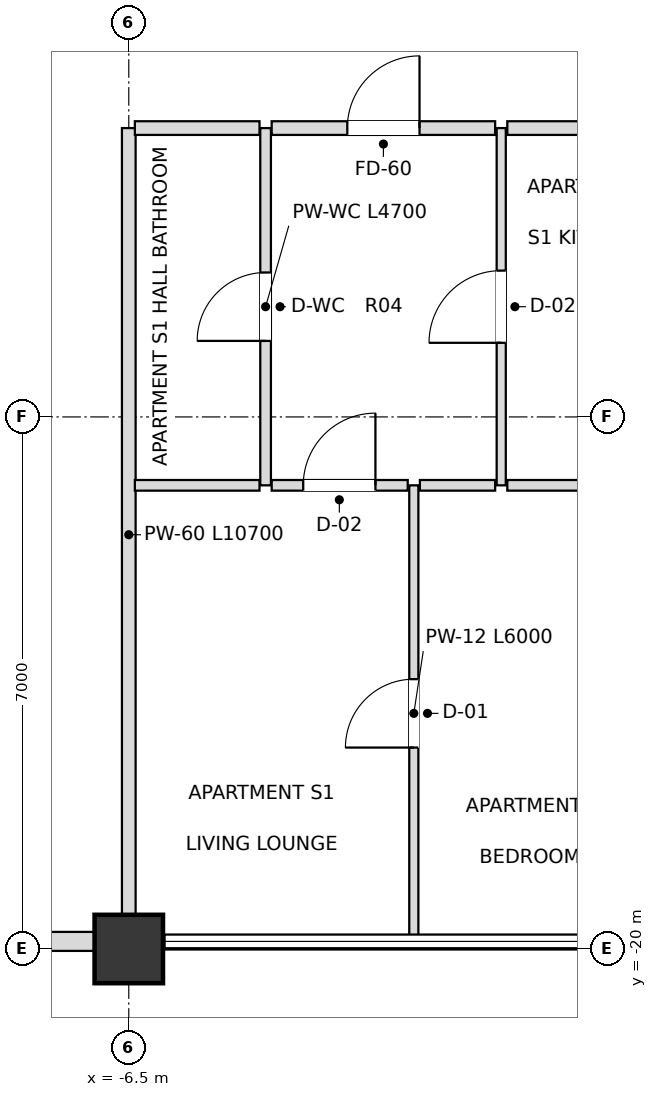
"""IFC4 building model, lengths in metres.
Left out: names, types, materials, properties, quantities, classifications, styles, units other than length and angle.
Written with IfcOpenShell. Run it as: python <this file> out.ifc"""

import sys

from ifc_helpers import new_model, si_unit, direction, frame, frame_2d, origin, origin_2d, place, context, subcontext, project, spatial, rectangle, extrude, element, fill, save


model = new_model("IFC4")
c1 = context("Model", 3, precision=1e-05, world=origin(), true_north=direction((0.0, 1.0)))
c2 = subcontext(c1, "Body", "Model", "MODEL_VIEW")
j1 = project(units=[si_unit("LENGTHUNIT", "METRE"), si_unit("PLANEANGLEUNIT", "RADIAN")], contexts=[c1])
p1 = place(None, origin())
s1 = spatial("IfcSite", under=j1, at=p1, CompositionType="ELEMENT")
p2 = place(p1, origin())
s2 = spatial("IfcBuilding", under=s1, at=p2, CompositionType="ELEMENT")
p3 = place(p2, frame((0.0, 0.0, 243.9)))
s3 = spatial("IfcBuildingStorey", under=s2, at=p3, CompositionType="ELEMENT", Elevation=243.9)
p4 = place(p3, frame((-6.5, -20.0, 0.0), z_axis=(0.0, 0.0, 1.0), x_axis=(1.0, 0.0, 0.0)))
e1 = element("IfcColumn", 1, at=p4, inside=s3, PredefinedType="USERDEFINED", context=c2, shape_type="SweptSolid", body=[
    extrude(rectangle(XDim=0.9, YDim=0.9, at=origin_2d()), origin(), (0.0, 0.0, 1.0), 3.6),
])
p5 = place(p3, frame((-11.055, -19.9, 0.0), z_axis=(0.0, 0.0, 1.0), x_axis=(1.0, 0.0, 0.0)))
e2 = element("IfcWall", 2, at=p5, inside=s3, PredefinedType="SOLIDWALL", context=c2, shape_type="SweptSolid", body=[
    extrude(rectangle(XDim=4.11, YDim=0.25, at=frame_2d((2.055, 0.0))), origin(), (0.0, 0.0, 1.0), 2.748),
])
p6 = place(p5, frame((1.155, 0.0, 0.72)))
e3 = element("IfcOpeningElement", 3, at=p6, cuts=e2, PredefinedType="OPENING", context=c2, shape_type="SweptSolid", body=[
    extrude(rectangle(XDim=1.8, YDim=1.68, at=frame_2d((0.9, 0.84))), frame((0.0, 0.135, 0.0), z_axis=(0.0, -1.0, 0.0), x_axis=(1.0, 0.0, 0.0)), (0.0, 0.0, 1.0), 0.27),
])
p7 = place(p3, frame((-6.5, -19.9, 0.0), z_axis=(0.0, 0.0, 1.0), x_axis=(0.0, 1.0, 0.0)))
e4 = element("IfcWall", 4, at=p7, inside=s3, PredefinedType="PARTITIONING", context=c2, shape_type="SweptSolid", body=[
    extrude(rectangle(XDim=10.7, YDim=0.18, at=frame_2d((5.35, 0.0))), origin(), (0.0, 0.0, 1.0), 2.826),
])
p8 = place(p3, frame((-4.7, -13.9, 0.0), z_axis=(0.0, 0.0, 1.0), x_axis=(0.0, 1.0, 0.0)))
e5 = element("IfcWall", 5, at=p8, inside=s3, PredefinedType="PARTITIONING", context=c2, shape_type="SweptSolid", body=[
    extrude(rectangle(XDim=4.7, YDim=0.14, at=frame_2d((2.35, 0.0))), origin(), (0.0, 0.0, 1.0), 3.38),
])
p9 = place(p8, frame((1.9, 0.0, 0.0)))
e6 = element("IfcOpeningElement", 6, at=p9, cuts=e5, PredefinedType="OPENING", context=c2, shape_type="SweptSolid", body=[
    extrude(rectangle(XDim=0.9, YDim=2.1, at=frame_2d((0.45, 1.05))), frame((0.0, 0.08, 0.0), z_axis=(0.0, -1.0, 0.0), x_axis=(1.0, 0.0, 0.0)), (0.0, 0.0, 1.0), 0.16),
])
p10 = place(p3, frame((-2.75, -19.9, 0.0), z_axis=(0.0, 0.0, 1.0), x_axis=(0.0, 1.0, 0.0)))
e7 = element("IfcWall", 7, at=p10, inside=s3, PredefinedType="PARTITIONING", context=c2, shape_type="SweptSolid", body=[
    extrude(rectangle(XDim=6.0, YDim=0.12, at=frame_2d((3.0, 0.0))), origin(), (0.0, 0.0, 1.0), 3.018),
])
p11 = place(p10, frame((2.55, 0.0, 0.0)))
e8 = element("IfcOpeningElement", 8, at=p11, cuts=e7, PredefinedType="OPENING", context=c2, shape_type="SweptSolid", body=[
    extrude(rectangle(XDim=0.9, YDim=2.1, at=frame_2d((0.45, 1.05))), frame((0.0, 0.07, 0.0), z_axis=(0.0, -1.0, 0.0), x_axis=(1.0, 0.0, 0.0)), (0.0, 0.0, 1.0), 0.14),
])
p12 = place(p3, frame((-1.6, -13.9, 0.0), z_axis=(0.0, 0.0, 1.0), x_axis=(0.0, 1.0, 0.0)))
e9 = element("IfcWall", 9, at=p12, inside=s3, PredefinedType="PARTITIONING", context=c2, shape_type="SweptSolid", body=[
    extrude(rectangle(XDim=4.7, YDim=0.12, at=frame_2d((2.35, 0.0))), origin(), (0.0, 0.0, 1.0), 3.38),
])
p13 = place(p12, frame((1.875, 0.0, 0.0)))
e10 = element("IfcOpeningElement", 10, at=p13, cuts=e9, PredefinedType="OPENING", context=c2, shape_type="SweptSolid", body=[
    extrude(rectangle(XDim=0.95, YDim=2.1, at=frame_2d((0.475, 1.05))), frame((0.0, 0.07, 0.0), z_axis=(0.0, -1.0, 0.0), x_axis=(1.0, 0.0, 0.0)), (0.0, 0.0, 1.0), 0.14),
])
p14 = place(p3, frame((-6.42, -13.9, 0.0), z_axis=(0.0, 0.0, 1.0), x_axis=(1.0, 0.0, 0.0)))
e11 = element("IfcWall", 11, at=p14, inside=s3, PredefinedType="PARTITIONING", context=c2, shape_type="SweptSolid", body=[
    extrude(rectangle(XDim=1.64, YDim=0.14, at=frame_2d((0.82, 0.0))), origin(), (0.0, 0.0, 1.0), 3.38),
])
p15 = place(p3, frame((-4.62, -13.9, 0.0), z_axis=(0.0, 0.0, 1.0), x_axis=(1.0, 0.0, 0.0)))
e12 = element("IfcWall", 12, at=p15, inside=s3, PredefinedType="PARTITIONING", context=c2, shape_type="SweptSolid", body=[
    extrude(rectangle(XDim=1.79, YDim=0.14, at=frame_2d((0.895, 0.0))), origin(), (0.0, 0.0, 1.0), 3.38),
])
p16 = place(p15, frame((0.415, 0.0, 0.0)))
e13 = element("IfcOpeningElement", 13, at=p16, cuts=e12, PredefinedType="OPENING", context=c2, shape_type="SweptSolid", body=[
    extrude(rectangle(XDim=0.95, YDim=2.1, at=frame_2d((0.475, 1.05))), frame((0.0, 0.08, 0.0), z_axis=(0.0, -1.0, 0.0), x_axis=(1.0, 0.0, 0.0)), (0.0, 0.0, 1.0), 0.16),
])
p17 = place(p3, frame((-2.67, -13.9, 0.0), z_axis=(0.0, 0.0, 1.0), x_axis=(1.0, 0.0, 0.0)))
e14 = element("IfcWall", 14, at=p17, inside=s3, PredefinedType="PARTITIONING", context=c2, shape_type="SweptSolid", body=[
    extrude(rectangle(XDim=0.99, YDim=0.14, at=frame_2d((0.495, 0.0))), origin(), (0.0, 0.0, 1.0), 3.38),
])
p18 = place(p3, frame((-1.52, -13.9, 0.0), z_axis=(0.0, 0.0, 1.0), x_axis=(1.0, 0.0, 0.0)))
e15 = element("IfcWall", 15, at=p18, inside=s3, PredefinedType="PARTITIONING", context=c2, shape_type="SweptSolid", body=[
    extrude(rectangle(XDim=1.89, YDim=0.14, at=frame_2d((0.945, 0.0))), origin(), (0.0, 0.0, 1.0), 3.38),
])
p19 = place(p3, frame((-6.42, -9.2, 0.0), z_axis=(0.0, 0.0, 1.0), x_axis=(1.0, 0.0, 0.0)))
e16 = element("IfcWall", 16, at=p19, inside=s3, PredefinedType="PARTITIONING", context=c2, shape_type="SweptSolid", body=[
    extrude(rectangle(XDim=1.64, YDim=0.18, at=frame_2d((0.82, 0.0))), origin(), (0.0, 0.0, 1.0), 3.38),
])
p20 = place(p3, frame((-4.62, -9.2, 0.0), z_axis=(0.0, 0.0, 1.0), x_axis=(1.0, 0.0, 0.0)))
e17 = element("IfcWall", 17, at=p20, inside=s3, PredefinedType="PARTITIONING", context=c2, shape_type="SweptSolid", body=[
    extrude(rectangle(XDim=2.94, YDim=0.18, at=frame_2d((1.47, 0.0))), origin(), (0.0, 0.0, 1.0), 3.38),
])
p21 = place(p20, frame((0.995, 0.0, 0.0)))
e18 = element("IfcOpeningElement", 18, at=p21, cuts=e17, PredefinedType="OPENING", context=c2, shape_type="SweptSolid", body=[
    extrude(rectangle(XDim=0.95, YDim=2.15, at=frame_2d((0.475, 1.075))), frame((0.0, 0.1, 0.0), z_axis=(0.0, -1.0, 0.0), x_axis=(1.0, 0.0, 0.0)), (0.0, 0.0, 1.0), 0.2),
])
p22 = place(p3, frame((-1.52, -9.2, 0.0), z_axis=(0.0, 0.0, 1.0), x_axis=(1.0, 0.0, 0.0)))
e19 = element("IfcWall", 19, at=p22, inside=s3, PredefinedType="PARTITIONING", context=c2, shape_type="SweptSolid", body=[
    extrude(rectangle(XDim=1.89, YDim=0.18, at=frame_2d((0.945, 0.0))), origin(), (0.0, 0.0, 1.0), 3.38),
])
p23 = place(p9, origin())
e20 = element("IfcDoor", 20, at=p23, inside=s3, OperationType="SINGLE_SWING_LEFT", PredefinedType="DOOR", context=c2, shape_type="SweptSolid", body=[
    extrude(rectangle(XDim=0.9, YDim=2.1, at=frame_2d((0.45, 1.05))), frame((0.0, 0.025, 0.0), z_axis=(0.0, -1.0, 0.0), x_axis=(1.0, 0.0, 0.0)), (0.0, 0.0, 1.0), 0.05),
])
fill(e6, e20)
p24 = place(p21, origin())
e21 = element("IfcDoor", 21, at=p24, inside=s3, OperationType="SINGLE_SWING_RIGHT", PredefinedType="DOOR", context=c2, shape_type="SweptSolid", body=[
    extrude(rectangle(XDim=0.95, YDim=2.15, at=frame_2d((0.475, 1.075))), frame((0.0, 0.025, 0.0), z_axis=(0.0, -1.0, 0.0), x_axis=(1.0, 0.0, 0.0)), (0.0, 0.0, 1.0), 0.05),
])
fill(e18, e21)
p25 = place(p13, origin())
e22 = element("IfcDoor", 22, at=p25, inside=s3, OperationType="SINGLE_SWING_LEFT", PredefinedType="DOOR", context=c2, shape_type="SweptSolid", body=[
    extrude(rectangle(XDim=0.95, YDim=2.1, at=frame_2d((0.475, 1.05))), frame((0.0, 0.025, 0.0), z_axis=(0.0, -1.0, 0.0), x_axis=(1.0, 0.0, 0.0)), (0.0, 0.0, 1.0), 0.05),
])
fill(e10, e22)
p26 = place(p16, origin())
e23 = element("IfcDoor", 23, at=p26, inside=s3, OperationType="SINGLE_SWING_RIGHT", PredefinedType="DOOR", context=c2, shape_type="SweptSolid", body=[
    extrude(rectangle(XDim=0.95, YDim=2.1, at=frame_2d((0.475, 1.05))), frame((0.0, 0.025, 0.0), z_axis=(0.0, -1.0, 0.0), x_axis=(1.0, 0.0, 0.0)), (0.0, 0.0, 1.0), 0.05),
])
fill(e13, e23)
p27 = place(p11, origin())
e24 = element("IfcDoor", 24, at=p27, inside=s3, OperationType="SINGLE_SWING_LEFT", PredefinedType="DOOR", context=c2, shape_type="SweptSolid", body=[
    extrude(rectangle(XDim=0.9, YDim=2.1, at=frame_2d((0.45, 1.05))), frame((0.0, 0.025, 0.0), z_axis=(0.0, -1.0, 0.0), x_axis=(1.0, 0.0, 0.0)), (0.0, 0.0, 1.0), 0.05),
])
fill(e8, e24)
save(model, sys.argv[1])
